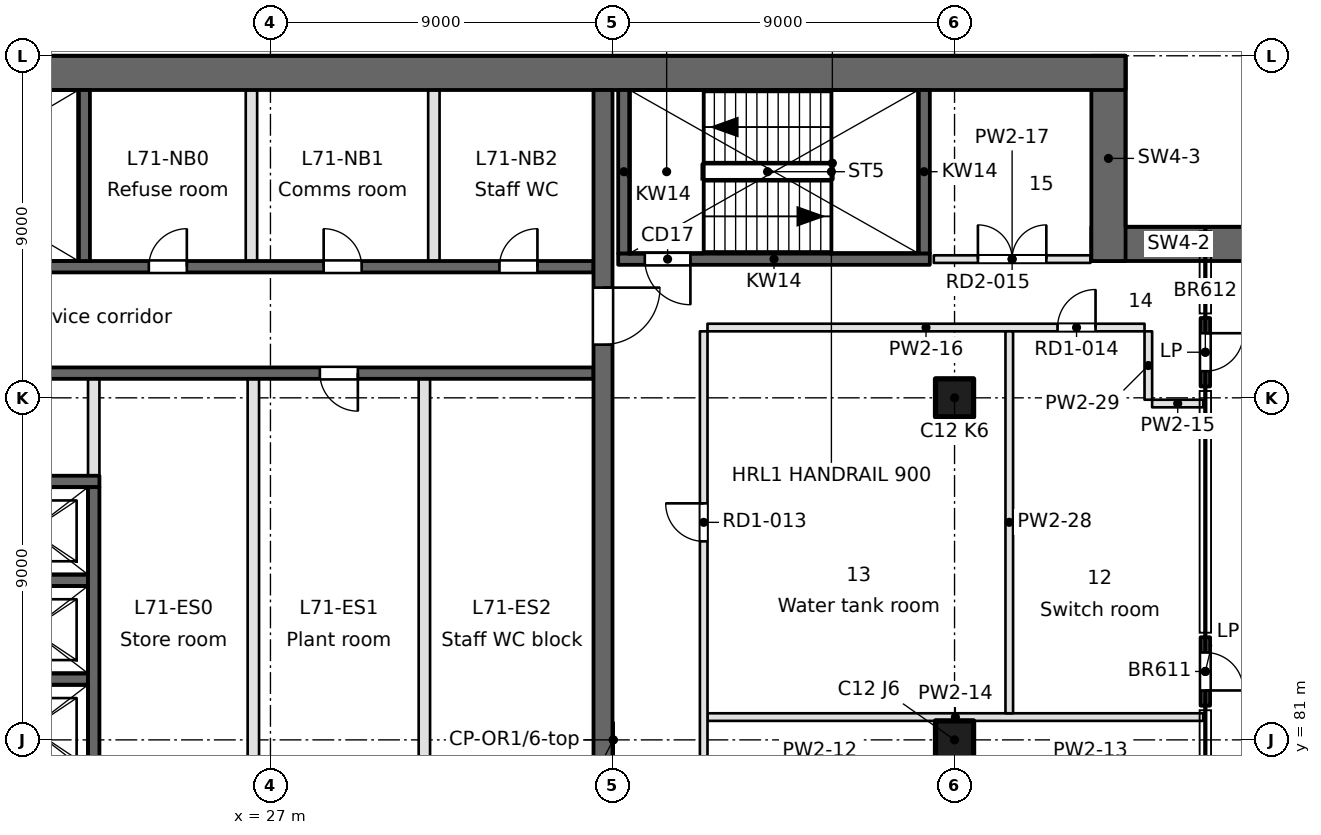
"""IFC4 building model, lengths in metres.
Left out: names, types, materials, properties, quantities, classifications, styles, units other than length and angle.
Written with IfcOpenShell. Run it as: python <this file> out.ifc"""

import sys

from ifc_helpers import new_model, si_unit, direction, frame, frame_2d, origin, origin_2d, place, context, subcontext, project, spatial, rectangle, extrude, element, fill, save


model = new_model("IFC4")
c1 = context("Model", 3, precision=1e-05, world=origin(), true_north=direction((0.0, 1.0)))
c2 = subcontext(c1, "Body", "Model", "MODEL_VIEW")
j1 = project(units=[si_unit("LENGTHUNIT", "METRE"), si_unit("PLANEANGLEUNIT", "RADIAN")], contexts=[c1])
p1 = place(None, origin())
s1 = spatial("IfcSite", under=j1, at=p1, CompositionType="ELEMENT")
p2 = place(p1, origin())
s2 = spatial("IfcBuilding", under=s1, at=p2, CompositionType="ELEMENT")
p3 = place(p2, frame((0.0, 0.0, 276.2)))
s3 = spatial("IfcBuildingStorey", under=s2, at=p3, CompositionType="ELEMENT", Elevation=276.2)
for number, where, z_axis, x_axis in (
    (1, (45.0, 81.0, 0.0), (0.0, 0.0, 1.0), (1.0, 0.0, 0.0)),
    (2, (45.0, 90.0, 0.0), (0.0, 0.0, 1.0), (1.0, 0.0, 0.0)),
):
    element("IfcColumn", number, at=place(p3, frame(where, z_axis=z_axis, x_axis=x_axis)), inside=s3, PredefinedType="COLUMN", context=c2, shape_type="SweptSolid", body=[
        extrude(rectangle(XDim=1.0, YDim=1.0, at=origin_2d()), origin(), (0.0, 0.0, 1.0), 4.6),
    ])
p4 = place(p3, frame((53.2, 94.05, 0.0), z_axis=(0.0, 0.0, 1.0), x_axis=(-1.0, 0.0, 0.0)))
e3 = element("IfcWall", 3, at=p4, inside=s3, PredefinedType="SHEAR", context=c2, shape_type="SweptSolid", body=[
    extrude(rectangle(XDim=4.6, YDim=0.9, at=frame_2d((2.3, 0.0))), origin(), (0.0, 0.0, 1.0), 4.6),
])
p5 = place(p3, frame((49.05, 93.6, 0.0), z_axis=(0.0, 0.0, 1.0), x_axis=(0.0, 1.0, 0.0)))
e4 = element("IfcWall", 4, at=p5, inside=s3, PredefinedType="SHEAR", context=c2, shape_type="SweptSolid", body=[
    extrude(rectangle(XDim=5.4, YDim=0.9, at=frame_2d((2.7, 0.0))), origin(), (0.0, 0.0, 1.0), 4.6),
])
p6 = place(p3, frame((49.5, 98.55, 0.0), z_axis=(0.0, 0.0, 1.0), x_axis=(-1.0, 0.0, 0.0)))
e5 = element("IfcWall", 5, at=p6, inside=s3, PredefinedType="SHEAR", context=c2, shape_type="SweptSolid", body=[
    extrude(rectangle(XDim=45.0, YDim=0.9, at=frame_2d((22.5, 0.0))), origin(), (0.0, 0.0, 1.0), 4.6),
])
p7 = place(p3, frame((51.599, 81.9, 0.0), z_axis=(0.0, 0.0, 1.0), x_axis=(0.0, 1.0, 0.0)))
e6 = element("IfcWall", 6, at=p7, inside=s3, PredefinedType="SOLIDWALL", context=c2, shape_type="SweptSolid", body=[
    extrude(rectangle(XDim=1.8, YDim=0.25, at=frame_2d((0.9, 0.0))), origin(), (0.0, 0.0, 1.0), 4.2),
])
p8 = place(p7, frame((0.4, 0.0, 0.0)))
e7 = element("IfcOpeningElement", 7, at=p8, cuts=e6, PredefinedType="OPENING", context=c2, shape_type="SweptSolid", body=[
    extrude(rectangle(XDim=1.0, YDim=2.1, at=frame_2d((0.5, 1.05))), frame((0.0, 0.125, 0.0), z_axis=(0.0, -1.0, 0.0), x_axis=(1.0, 0.0, 0.0)), (0.0, 0.0, 1.0), 0.25),
])
p9 = place(p3, frame((51.599, 90.3, 0.0), z_axis=(0.0, 0.0, 1.0), x_axis=(0.0, 1.0, 0.0)))
e8 = element("IfcWall", 8, at=p9, inside=s3, PredefinedType="SOLIDWALL", context=c2, shape_type="SweptSolid", body=[
    extrude(rectangle(XDim=1.8, YDim=0.25, at=frame_2d((0.9, 0.0))), origin(), (0.0, 0.0, 1.0), 4.2),
])
p10 = place(p9, frame((0.4, 0.0, 0.0)))
e9 = element("IfcOpeningElement", 9, at=p10, cuts=e8, PredefinedType="OPENING", context=c2, shape_type="SweptSolid", body=[
    extrude(rectangle(XDim=1.0, YDim=2.1, at=frame_2d((0.5, 1.05))), frame((0.0, 0.125, 0.0), z_axis=(0.0, -1.0, 0.0), x_axis=(1.0, 0.0, 0.0)), (0.0, 0.0, 1.0), 0.25),
])
for number, where, z_axis, x_axis in (
    (10, (19.2, 82.6, -0.45), (0.0, 0.0, 1.0), (1.0, 0.0, 0.0)),
    (11, (19.2, 85.2, -0.45), (0.0, 0.0, 1.0), (1.0, 0.0, 0.0)),
):
    element("IfcWall", number, at=place(p3, frame(where, z_axis=z_axis, x_axis=x_axis)), inside=s3, PredefinedType="SOLIDWALL", context=c2, shape_type="SweptSolid", body=[
        extrude(rectangle(XDim=3.0, YDim=0.3, at=frame_2d((1.5, 0.0))), origin(), (0.0, 0.0, 1.0), 4.65),
    ])
p11 = place(p3, frame((11.4, 87.8, -0.45), z_axis=(0.0, 0.0, 1.0), x_axis=(1.0, 0.0, 0.0)))
e12 = element("IfcWall", 12, at=p11, inside=s3, PredefinedType="SOLIDWALL", context=c2, shape_type="SweptSolid", body=[
    extrude(rectangle(XDim=11.1, YDim=0.3, at=frame_2d((5.55, 0.0))), origin(), (0.0, 0.0, 1.0), 4.65),
])
p12 = place(p3, frame((0.9, 90.65, -0.45), z_axis=(0.0, 0.0, 1.0), x_axis=(1.0, 0.0, 0.0)))
e13 = element("IfcWall", 13, at=p12, inside=s3, PredefinedType="SOLIDWALL", context=c2, shape_type="SweptSolid", body=[
    extrude(rectangle(XDim=34.6, YDim=0.3, at=frame_2d((17.3, 0.0))), origin(), (0.0, 0.0, 1.0), 4.65),
])
p13 = place(p12, frame((15.55, 0.0, 0.45)))
e14 = element("IfcOpeningElement", 14, at=p13, cuts=e13, PredefinedType="OPENING", context=c2, shape_type="SweptSolid", body=[
    extrude(rectangle(XDim=1.0, YDim=2.1, at=frame_2d((0.5, 1.05))), frame((0.0, 0.15, 0.0), z_axis=(0.0, -1.0, 0.0), x_axis=(1.0, 0.0, 0.0)), (0.0, 0.0, 1.0), 0.3),
])
p14 = place(p12, frame((4.75, 0.0, 0.45)))
e15 = element("IfcOpeningElement", 15, at=p14, cuts=e13, PredefinedType="OPENING", context=c2, shape_type="SweptSolid", body=[
    extrude(rectangle(XDim=1.0, YDim=2.1, at=frame_2d((0.5, 1.05))), frame((0.0, 0.15, 0.0), z_axis=(0.0, -1.0, 0.0), x_axis=(1.0, 0.0, 0.0)), (0.0, 0.0, 1.0), 0.3),
])
p15 = place(p12, frame((27.4, 0.0, 0.45)))
e16 = element("IfcOpeningElement", 16, at=p15, cuts=e13, PredefinedType="OPENING", context=c2, shape_type="SweptSolid", body=[
    extrude(rectangle(XDim=1.0, YDim=2.1, at=frame_2d((0.5, 1.05))), frame((0.0, 0.15, 0.0), z_axis=(0.0, -1.0, 0.0), x_axis=(1.0, 0.0, 0.0)), (0.0, 0.0, 1.0), 0.3),
])
p16 = place(p3, frame((0.9, 93.45, -0.45), z_axis=(0.0, 0.0, 1.0), x_axis=(1.0, 0.0, 0.0)))
e17 = element("IfcWall", 17, at=p16, inside=s3, PredefinedType="SOLIDWALL", context=c2, shape_type="SweptSolid", body=[
    extrude(rectangle(XDim=34.6, YDim=0.3, at=frame_2d((17.3, 0.0))), origin(), (0.0, 0.0, 1.0), 4.65),
])
p17 = place(p16, frame((9.7, 0.0, 0.45)))
e18 = element("IfcOpeningElement", 18, at=p17, cuts=e17, PredefinedType="OPENING", context=c2, shape_type="SweptSolid", body=[
    extrude(rectangle(XDim=1.2, YDim=2.1, at=frame_2d((0.6, 1.05))), frame((0.0, 0.15, 0.0), z_axis=(0.0, -1.0, 0.0), x_axis=(1.0, 0.0, 0.0)), (0.0, 0.0, 1.0), 0.3),
])
p18 = place(p16, frame((22.9, 0.0, 0.45)))
e19 = element("IfcOpeningElement", 19, at=p18, cuts=e17, PredefinedType="OPENING", context=c2, shape_type="SweptSolid", body=[
    extrude(rectangle(XDim=1.0, YDim=2.1, at=frame_2d((0.5, 1.05))), frame((0.0, 0.15, 0.0), z_axis=(0.0, -1.0, 0.0), x_axis=(1.0, 0.0, 0.0)), (0.0, 0.0, 1.0), 0.3),
])
p19 = place(p16, frame((27.5, 0.0, 0.45)))
e20 = element("IfcOpeningElement", 20, at=p19, cuts=e17, PredefinedType="OPENING", context=c2, shape_type="SweptSolid", body=[
    extrude(rectangle(XDim=1.0, YDim=2.1, at=frame_2d((0.5, 1.05))), frame((0.0, 0.15, 0.0), z_axis=(0.0, -1.0, 0.0), x_axis=(1.0, 0.0, 0.0)), (0.0, 0.0, 1.0), 0.3),
])
p20 = place(p16, frame((32.125, 0.0, 0.45)))
e21 = element("IfcOpeningElement", 21, at=p20, cuts=e17, PredefinedType="OPENING", context=c2, shape_type="SweptSolid", body=[
    extrude(rectangle(XDim=1.0, YDim=2.1, at=frame_2d((0.5, 1.05))), frame((0.0, 0.15, 0.0), z_axis=(0.0, -1.0, 0.0), x_axis=(1.0, 0.0, 0.0)), (0.0, 0.0, 1.0), 0.3),
])
p21 = place(p3, frame((36.15, 93.65, -0.45), z_axis=(0.0, 0.0, 1.0), x_axis=(1.0, 0.0, 0.0)))
e22 = element("IfcWall", 22, at=p21, inside=s3, PredefinedType="SOLIDWALL", context=c2, shape_type="SweptSolid", body=[
    extrude(rectangle(XDim=8.2, YDim=0.3, at=frame_2d((4.1, 0.0))), origin(), (0.0, 0.0, 1.0), 4.65),
])
p22 = place(p21, frame((0.7, 0.0, 0.45)))
e23 = element("IfcOpeningElement", 23, at=p22, cuts=e22, PredefinedType="OPENING", context=c2, shape_type="SweptSolid", body=[
    extrude(rectangle(XDim=1.2, YDim=2.1, at=frame_2d((0.6, 1.05))), frame((0.0, 0.15, 0.0), z_axis=(0.0, -1.0, 0.0), x_axis=(1.0, 0.0, 0.0)), (0.0, 0.0, 1.0), 0.3),
])
p23 = place(p3, frame((22.1, 93.6, -0.45), z_axis=(0.0, 0.0, 1.0), x_axis=(0.0, 1.0, 0.0)))
e24 = element("IfcWall", 24, at=p23, inside=s3, PredefinedType="SOLIDWALL", context=c2, shape_type="SweptSolid", body=[
    extrude(rectangle(XDim=4.5, YDim=0.3, at=frame_2d((2.25, 0.0))), origin(), (0.0, 0.0, 1.0), 4.65),
])
p24 = place(p3, frame((22.35, 77.55, -0.45), z_axis=(0.0, 0.0, 1.0), x_axis=(0.0, 1.0, 0.0)))
e25 = element("IfcWall", 25, at=p24, inside=s3, PredefinedType="SOLIDWALL", context=c2, shape_type="SweptSolid", body=[
    extrude(rectangle(XDim=10.1, YDim=0.3, at=frame_2d((5.05, 0.0))), origin(), (0.0, 0.0, 1.0), 4.65),
])
p25 = place(p3, frame((22.35, 87.95, 0.0), z_axis=(0.0, 0.0, 1.0), x_axis=(0.0, 1.0, 0.0)))
e26 = element("IfcWall", 26, at=p25, inside=s3, PredefinedType="PARTITIONING", context=c2, shape_type="SweptSolid", body=[
    extrude(rectangle(XDim=2.55, YDim=0.3, at=frame_2d((1.275, 0.0))), origin(), (0.0, 0.0, 1.0), 4.2),
])
p26 = place(p3, frame((26.5, 93.6, 0.0), z_axis=(0.0, 0.0, 1.0), x_axis=(0.0, 1.0, 0.0)))
e27 = element("IfcWall", 27, at=p26, inside=s3, PredefinedType="PARTITIONING", context=c2, shape_type="SweptSolid", body=[
    extrude(rectangle(XDim=4.5, YDim=0.3, at=frame_2d((2.25, 0.0))), origin(), (0.0, 0.0, 1.0), 4.2),
])
for number, where, z_axis, x_axis in (
    (28, (26.55, 77.55, 0.0), (0.0, 0.0, 1.0), (0.0, 1.0, 0.0)),
    (29, (31.05, 77.55, 0.0), (0.0, 0.0, 1.0), (0.0, 1.0, 0.0)),
):
    element("IfcWall", number, at=place(p3, frame(where, z_axis=z_axis, x_axis=x_axis)), inside=s3, PredefinedType="PARTITIONING", context=c2, shape_type="SweptSolid", body=[
        extrude(rectangle(XDim=12.95, YDim=0.3, at=frame_2d((6.475, 0.0))), origin(), (0.0, 0.0, 1.0), 4.2),
    ])
p27 = place(p3, frame((31.3, 93.6, 0.0), z_axis=(0.0, 0.0, 1.0), x_axis=(0.0, 1.0, 0.0)))
e30 = element("IfcWall", 30, at=p27, inside=s3, PredefinedType="PARTITIONING", context=c2, shape_type="SweptSolid", body=[
    extrude(rectangle(XDim=4.5, YDim=0.3, at=frame_2d((2.25, 0.0))), origin(), (0.0, 0.0, 1.0), 4.2),
])
p28 = place(p3, frame((35.75, 63.5, -0.45), z_axis=(0.0, 0.0, 1.0), x_axis=(0.0, 1.0, 0.0)))
e31 = element("IfcWall", 31, at=p28, inside=s3, PredefinedType="SOLIDWALL", context=c2, shape_type="SweptSolid", body=[
    extrude(rectangle(XDim=34.6, YDim=0.5, at=frame_2d((17.3, 0.0))), origin(), (0.0, 0.0, 1.0), 4.65),
])
p29 = place(p28, frame((9.7, 0.0, 0.45)))
e32 = element("IfcOpeningElement", 32, at=p29, cuts=e31, PredefinedType="OPENING", context=c2, shape_type="SweptSolid", body=[
    extrude(rectangle(XDim=2.4, YDim=2.1, at=frame_2d((1.2, 1.05))), frame((0.0, 0.25, 0.0), z_axis=(0.0, -1.0, 0.0), x_axis=(1.0, 0.0, 0.0)), (0.0, 0.0, 1.0), 0.5),
])
p30 = place(p28, frame((27.9, 0.0, 0.45)))
e33 = element("IfcOpeningElement", 33, at=p30, cuts=e31, PredefinedType="OPENING", context=c2, shape_type="SweptSolid", body=[
    extrude(rectangle(XDim=1.5, YDim=2.1, at=frame_2d((0.75, 1.05))), frame((0.0, 0.25, 0.0), z_axis=(0.0, -1.0, 0.0), x_axis=(1.0, 0.0, 0.0)), (0.0, 0.0, 1.0), 0.5),
])
p31 = place(p28, frame((1.5, 0.0, 0.45)))
e34 = element("IfcOpeningElement", 34, at=p31, cuts=e31, PredefinedType="OPENING", context=c2, shape_type="SweptSolid", body=[
    extrude(rectangle(XDim=1.2, YDim=2.1, at=frame_2d((0.6, 1.05))), frame((0.0, 0.25, 0.0), z_axis=(0.0, -1.0, 0.0), x_axis=(1.0, 0.0, 0.0)), (0.0, 0.0, 1.0), 0.5),
])
for number, where, z_axis, x_axis in (
    (35, (36.3, 93.8, -0.45), (0.0, 0.0, 1.0), (0.0, 1.0, 0.0)),
    (36, (44.2, 93.8, -0.45), (0.0, 0.0, 1.0), (0.0, 1.0, 0.0)),
):
    element("IfcWall", number, at=place(p3, frame(where, z_axis=z_axis, x_axis=x_axis)), inside=s3, PredefinedType="SOLIDWALL", context=c2, shape_type="SweptSolid", body=[
        extrude(rectangle(XDim=4.3, YDim=0.3, at=frame_2d((2.15, 0.0))), origin(), (0.0, 0.0, 1.0), 4.65),
    ])
p32 = place(p3, frame((38.5, 81.6, 0.0), z_axis=(0.0, 0.0, 1.0), x_axis=(1.0, 0.0, 0.0)))
e37 = element("IfcWall", 37, at=p32, inside=s3, PredefinedType="PARTITIONING", context=c2, shape_type="SweptSolid", body=[
    extrude(rectangle(XDim=13.045, YDim=0.2, at=frame_2d((6.522, 0.0))), origin(), (0.0, 0.0, 1.0), 4.2),
])
p33 = place(p3, frame((51.545, 89.85, 0.0), z_axis=(0.0, 0.0, 1.0), x_axis=(-1.0, 0.0, 0.0)))
e38 = element("IfcWall", 38, at=p33, inside=s3, PredefinedType="PARTITIONING", context=c2, shape_type="SweptSolid", body=[
    extrude(rectangle(XDim=1.346, YDim=0.2, at=frame_2d((0.673, 0.0))), origin(), (0.0, 0.0, 1.0), 4.2),
])
p34 = place(p3, frame((49.999, 91.85, 0.0), z_axis=(0.0, 0.0, 1.0), x_axis=(-1.0, 0.0, 0.0)))
e39 = element("IfcWall", 39, at=p34, inside=s3, PredefinedType="PARTITIONING", context=c2, shape_type="SweptSolid", body=[
    extrude(rectangle(XDim=11.499, YDim=0.2, at=frame_2d((5.75, 0.0))), origin(), (0.0, 0.0, 1.0), 4.2),
])
p35 = place(p34, frame((1.289, 0.0, 0.0)))
e40 = element("IfcOpeningElement", 40, at=p35, cuts=e39, PredefinedType="OPENING", context=c2, shape_type="SweptSolid", body=[
    extrude(rectangle(XDim=1.0, YDim=2.1, at=frame_2d((0.5, 1.05))), frame((0.0, 0.1, 0.0), z_axis=(0.0, -1.0, 0.0), x_axis=(1.0, 0.0, 0.0)), (0.0, 0.0, 1.0), 0.2),
])
p36 = place(p3, frame((44.454, 93.65, 0.0), z_axis=(0.0, 0.0, 1.0), x_axis=(1.0, 0.0, 0.0)))
e41 = element("IfcWall", 41, at=p36, inside=s3, PredefinedType="PARTITIONING", context=c2, shape_type="SweptSolid", body=[
    extrude(rectangle(XDim=4.122, YDim=0.2, at=frame_2d((2.061, 0.0))), origin(), (0.0, 0.0, 1.0), 4.2),
])
p37 = place(p36, frame((1.161, 0.0, 0.0)))
e42 = element("IfcOpeningElement", 42, at=p37, cuts=e41, PredefinedType="OPENING", context=c2, shape_type="SweptSolid", body=[
    extrude(rectangle(XDim=1.8, YDim=2.1, at=frame_2d((0.9, 1.05))), frame((0.0, 0.1, 0.0), z_axis=(0.0, -1.0, 0.0), x_axis=(1.0, 0.0, 0.0)), (0.0, 0.0, 1.0), 0.2),
])
p38 = place(p3, frame((38.4, 91.75, 0.0), z_axis=(0.0, 0.0, 1.0), x_axis=(0.0, -1.0, 0.0)))
e43 = element("IfcWall", 43, at=p38, inside=s3, PredefinedType="PARTITIONING", context=c2, shape_type="SweptSolid", body=[
    extrude(rectangle(XDim=28.65, YDim=0.2, at=frame_2d((14.325, 0.0))), origin(), (0.0, 0.0, 1.0), 4.2),
])
p39 = place(p38, frame((23.752, 0.0, 0.0)))
e44 = element("IfcOpeningElement", 44, at=p39, cuts=e43, PredefinedType="OPENING", context=c2, shape_type="SweptSolid", body=[
    extrude(rectangle(XDim=1.0, YDim=2.1, at=frame_2d((0.5, 1.05))), frame((0.0, 0.1, 0.0), z_axis=(0.0, -1.0, 0.0), x_axis=(1.0, 0.0, 0.0)), (0.0, 0.0, 1.0), 0.2),
])
p40 = place(p38, frame((21.252, 0.0, 0.0)))
e45 = element("IfcOpeningElement", 45, at=p40, cuts=e43, PredefinedType="OPENING", context=c2, shape_type="SweptSolid", body=[
    extrude(rectangle(XDim=1.0, YDim=2.1, at=frame_2d((0.5, 1.05))), frame((0.0, 0.1, 0.0), z_axis=(0.0, -1.0, 0.0), x_axis=(1.0, 0.0, 0.0)), (0.0, 0.0, 1.0), 0.2),
])
p41 = place(p38, frame((15.207, 0.0, 0.0)))
e46 = element("IfcOpeningElement", 46, at=p41, cuts=e43, PredefinedType="OPENING", context=c2, shape_type="SweptSolid", body=[
    extrude(rectangle(XDim=1.0, YDim=2.1, at=frame_2d((0.5, 1.05))), frame((0.0, 0.1, 0.0), z_axis=(0.0, -1.0, 0.0), x_axis=(1.0, 0.0, 0.0)), (0.0, 0.0, 1.0), 0.2),
])
p42 = place(p38, frame((12.707, 0.0, 0.0)))
e47 = element("IfcOpeningElement", 47, at=p42, cuts=e43, PredefinedType="OPENING", context=c2, shape_type="SweptSolid", body=[
    extrude(rectangle(XDim=1.0, YDim=2.1, at=frame_2d((0.5, 1.05))), frame((0.0, 0.1, 0.0), z_axis=(0.0, -1.0, 0.0), x_axis=(1.0, 0.0, 0.0)), (0.0, 0.0, 1.0), 0.2),
])
p43 = place(p38, frame((4.526, 0.0, 0.0)))
e48 = element("IfcOpeningElement", 48, at=p43, cuts=e43, PredefinedType="OPENING", context=c2, shape_type="SweptSolid", body=[
    extrude(rectangle(XDim=1.0, YDim=2.1, at=frame_2d((0.5, 1.05))), frame((0.0, 0.1, 0.0), z_axis=(0.0, -1.0, 0.0), x_axis=(1.0, 0.0, 0.0)), (0.0, 0.0, 1.0), 0.2),
])
p44 = place(p3, frame((46.44, 91.75, 0.0), z_axis=(0.0, 0.0, 1.0), x_axis=(0.0, -1.0, 0.0)))
e49 = element("IfcWall", 49, at=p44, inside=s3, PredefinedType="PARTITIONING", context=c2, shape_type="SweptSolid", body=[
    extrude(rectangle(XDim=10.05, YDim=0.2, at=frame_2d((5.025, 0.0))), origin(), (0.0, 0.0, 1.0), 4.2),
])
p45 = place(p3, frame((50.099, 89.95, 0.0), z_axis=(0.0, 0.0, 1.0), x_axis=(0.0, 1.0, 0.0)))
e50 = element("IfcWall", 50, at=p45, inside=s3, PredefinedType="PARTITIONING", context=c2, shape_type="SweptSolid", body=[
    extrude(rectangle(XDim=1.8, YDim=0.2, at=frame_2d((0.9, 0.0))), origin(), (0.0, 0.0, 1.0), 4.2),
])
p46 = place(p8, frame((1.0, 0.0, 0.0), z_axis=(0.0, 0.0, 1.0), x_axis=(-1.0, 0.0, 0.0)))
e51 = element("IfcDoor", 51, at=p46, inside=s3, OperationType="SINGLE_SWING_RIGHT", PredefinedType="DOOR", context=c2, shape_type="SweptSolid", body=[
    extrude(rectangle(XDim=1.0, YDim=2.1, at=frame_2d((0.5, 1.05))), frame((0.0, 0.025, 0.0), z_axis=(0.0, -1.0, 0.0), x_axis=(1.0, 0.0, 0.0)), (0.0, 0.0, 1.0), 0.05),
])
fill(e7, e51)
p47 = place(p10, frame((1.0, 0.0, 0.0), z_axis=(0.0, 0.0, 1.0), x_axis=(-1.0, 0.0, 0.0)))
e52 = element("IfcDoor", 52, at=p47, inside=s3, OperationType="SINGLE_SWING_LEFT", PredefinedType="DOOR", context=c2, shape_type="SweptSolid", body=[
    extrude(rectangle(XDim=1.0, YDim=2.1, at=frame_2d((0.5, 1.05))), frame((0.0, 0.025, 0.0), z_axis=(0.0, -1.0, 0.0), x_axis=(1.0, 0.0, 0.0)), (0.0, 0.0, 1.0), 0.05),
])
fill(e9, e52)
p48 = place(p30, frame((1.5, 0.0, 0.0), z_axis=(0.0, 0.0, 1.0), x_axis=(-1.0, 0.0, 0.0)))
e53 = element("IfcDoor", 53, at=p48, inside=s3, OperationType="SINGLE_SWING_LEFT", PredefinedType="DOOR", context=c2, shape_type="SweptSolid", body=[
    extrude(rectangle(XDim=1.5, YDim=2.1, at=frame_2d((0.75, 1.05))), frame((0.0, 0.025, 0.0), z_axis=(0.0, -1.0, 0.0), x_axis=(1.0, 0.0, 0.0)), (0.0, 0.0, 1.0), 0.05),
])
fill(e33, e53)
p49 = place(p22, frame((1.2, 0.0, 0.0), z_axis=(0.0, 0.0, 1.0), x_axis=(-1.0, 0.0, 0.0)))
e54 = element("IfcDoor", 54, at=p49, inside=s3, OperationType="SINGLE_SWING_LEFT", PredefinedType="DOOR", context=c2, shape_type="SweptSolid", body=[
    extrude(rectangle(XDim=1.2, YDim=2.1, at=frame_2d((0.6, 1.05))), frame((0.0, 0.025, 0.0), z_axis=(0.0, -1.0, 0.0), x_axis=(1.0, 0.0, 0.0)), (0.0, 0.0, 1.0), 0.05),
])
fill(e23, e54)
p50 = place(p15, frame((1.0, 0.0, 0.0), z_axis=(0.0, 0.0, 1.0), x_axis=(-1.0, 0.0, 0.0)))
e55 = element("IfcDoor", 55, at=p50, inside=s3, OperationType="SINGLE_SWING_LEFT", PredefinedType="DOOR", context=c2, shape_type="SweptSolid", body=[
    extrude(rectangle(XDim=1.0, YDim=2.1, at=frame_2d((0.5, 1.05))), frame((0.0, 0.025, 0.0), z_axis=(0.0, -1.0, 0.0), x_axis=(1.0, 0.0, 0.0)), (0.0, 0.0, 1.0), 0.05),
])
fill(e16, e55)
p51 = place(p18, origin())
e56 = element("IfcDoor", 56, at=p51, inside=s3, OperationType="SINGLE_SWING_RIGHT", PredefinedType="DOOR", context=c2, shape_type="SweptSolid", body=[
    extrude(rectangle(XDim=1.0, YDim=2.1, at=frame_2d((0.5, 1.05))), frame((0.0, 0.025, 0.0), z_axis=(0.0, -1.0, 0.0), x_axis=(1.0, 0.0, 0.0)), (0.0, 0.0, 1.0), 0.05),
])
fill(e19, e56)
p52 = place(p19, origin())
e57 = element("IfcDoor", 57, at=p52, inside=s3, OperationType="SINGLE_SWING_LEFT", PredefinedType="DOOR", context=c2, shape_type="SweptSolid", body=[
    extrude(rectangle(XDim=1.0, YDim=2.1, at=frame_2d((0.5, 1.05))), frame((0.0, 0.025, 0.0), z_axis=(0.0, -1.0, 0.0), x_axis=(1.0, 0.0, 0.0)), (0.0, 0.0, 1.0), 0.05),
])
fill(e20, e57)
p53 = place(p20, origin())
e58 = element("IfcDoor", 58, at=p53, inside=s3, OperationType="SINGLE_SWING_RIGHT", PredefinedType="DOOR", context=c2, shape_type="SweptSolid", body=[
    extrude(rectangle(XDim=1.0, YDim=2.1, at=frame_2d((0.5, 1.05))), frame((0.0, 0.025, 0.0), z_axis=(0.0, -1.0, 0.0), x_axis=(1.0, 0.0, 0.0)), (0.0, 0.0, 1.0), 0.05),
])
fill(e21, e58)
p54 = place(p43, frame((1.0, 0.0, 0.0), z_axis=(0.0, 0.0, 1.0), x_axis=(-1.0, 0.0, 0.0)))
e59 = element("IfcDoor", 59, at=p54, inside=s3, OperationType="SINGLE_SWING_RIGHT", PredefinedType="DOOR", context=c2, shape_type="SweptSolid", body=[
    extrude(rectangle(XDim=1.0, YDim=2.1, at=frame_2d((0.5, 1.05))), frame((0.0, 0.025, 0.0), z_axis=(0.0, -1.0, 0.0), x_axis=(1.0, 0.0, 0.0)), (0.0, 0.0, 1.0), 0.05),
])
fill(e48, e59)
p55 = place(p35, frame((1.0, 0.0, 0.0), z_axis=(0.0, 0.0, 1.0), x_axis=(-1.0, 0.0, 0.0)))
e60 = element("IfcDoor", 60, at=p55, inside=s3, OperationType="SINGLE_SWING_RIGHT", PredefinedType="DOOR", context=c2, shape_type="SweptSolid", body=[
    extrude(rectangle(XDim=1.0, YDim=2.1, at=frame_2d((0.5, 1.05))), frame((0.0, 0.025, 0.0), z_axis=(0.0, -1.0, 0.0), x_axis=(1.0, 0.0, 0.0)), (0.0, 0.0, 1.0), 0.05),
])
fill(e40, e60)
p56 = place(p37, origin())
e61 = element("IfcDoor", 61, at=p56, inside=s3, OperationType="DOUBLE_DOOR_SINGLE_SWING", PredefinedType="DOOR", context=c2, shape_type="SweptSolid", body=[
    extrude(rectangle(XDim=1.8, YDim=2.1, at=frame_2d((0.9, 1.05))), frame((0.0, 0.025, 0.0), z_axis=(0.0, -1.0, 0.0), x_axis=(1.0, 0.0, 0.0)), (0.0, 0.0, 1.0), 0.05),
])
fill(e42, e61)
save(model, sys.argv[1])
